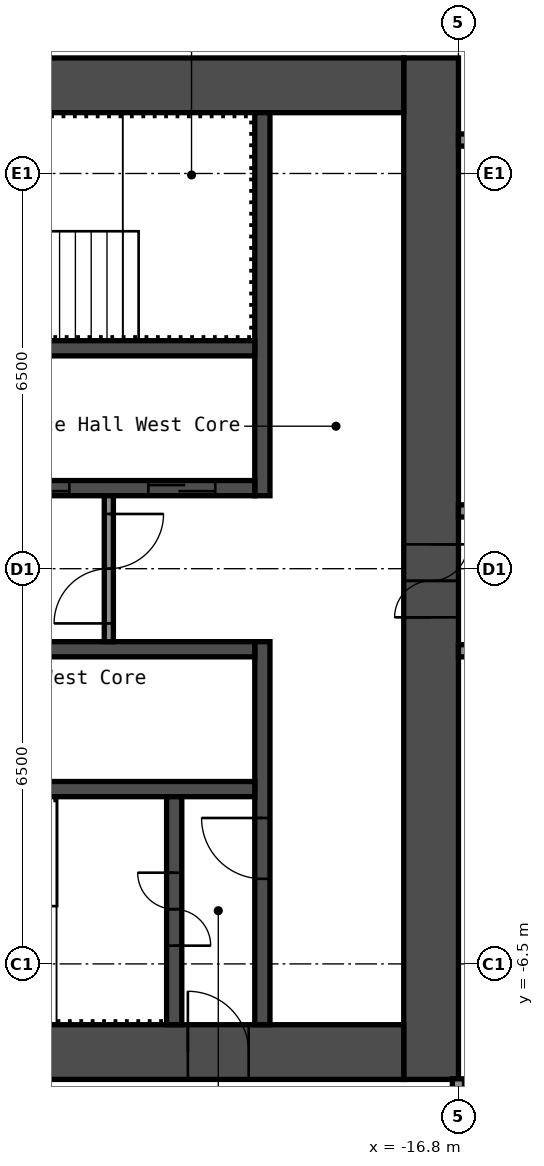
"""IFC4 building model, lengths in metres.
Left out: names, types, materials, properties, quantities, classifications, styles, units other than length and angle.
Written with IfcOpenShell. Run it as: python <this file> out.ifc"""

import sys

from ifc_helpers import new_model, si_unit, direction, frame, frame_2d, origin, place, context, subcontext, project, spatial, rectangle, extrude, element, fill, save


model = new_model("IFC4")
c1 = context("Model", 3, precision=1e-05, world=origin(), true_north=direction((0.0, 1.0)))
c2 = subcontext(c1, "Body", "Model", "MODEL_VIEW")
j1 = project(units=[si_unit("LENGTHUNIT", "METRE"), si_unit("PLANEANGLEUNIT", "RADIAN")], contexts=[c1])
p1 = place(None, origin())
s1 = spatial("IfcSite", under=j1, at=p1, CompositionType="ELEMENT")
p2 = place(p1, origin())
s2 = spatial("IfcBuilding", under=s1, at=p2, CompositionType="ELEMENT")
p3 = place(p2, frame((0.0, 0.0, 75.4)))
s3 = spatial("IfcBuildingStorey", under=s2, at=p3, CompositionType="ELEMENT", Elevation=75.4)
p4 = place(p3, frame((-17.25, -8.4, 0.0), z_axis=(0.0, 0.0, 1.0), x_axis=(0.0, 1.0, 0.0)))
e1 = element("IfcWall", 1, at=p4, inside=s3, PredefinedType="SHEAR", context=c2, shape_type="SweptSolid", body=[
    extrude(rectangle(XDim=16.8, YDim=0.9, at=frame_2d((8.4, 0.0))), origin(), (0.0, 0.0, 1.0), 2.8),
])
p5 = place(p4, frame((7.6, 0.0, 0.0)))
e2 = element("IfcOpeningElement", 2, at=p5, cuts=e1, PredefinedType="OPENING", context=c2, shape_type="SweptSolid", body=[
    extrude(rectangle(XDim=1.2, YDim=2.1, at=frame_2d((0.6, 1.05))), frame((0.0, 0.46, 0.0), z_axis=(0.0, -1.0, 0.0), x_axis=(1.0, 0.0, 0.0)), (0.0, 0.0, 1.0), 0.92),
])
p6 = place(p3, frame((-32.7, 7.95, 0.0), z_axis=(0.0, 0.0, 1.0), x_axis=(1.0, 0.0, 0.0)))
e3 = element("IfcWall", 3, at=p6, inside=s3, PredefinedType="SHEAR", context=c2, shape_type="SweptSolid", body=[
    extrude(rectangle(XDim=15.0, YDim=0.9, at=frame_2d((7.5, 0.0))), origin(), (0.0, 0.0, 1.0), 2.8),
])
p7 = place(p6, frame((3.4, 0.0, 0.0)))
e4 = element("IfcOpeningElement", 4, at=p7, cuts=e3, PredefinedType="OPENING", context=c2, shape_type="SweptSolid", body=[
    extrude(rectangle(XDim=1.2, YDim=2.1, at=frame_2d((0.6, 1.05))), frame((0.0, 0.46, 0.0), z_axis=(0.0, -1.0, 0.0), x_axis=(1.0, 0.0, 0.0)), (0.0, 0.0, 1.0), 0.92),
])
p8 = place(p6, frame((0.75, 0.0, 0.0)))
e5 = element("IfcOpeningElement", 5, at=p8, cuts=e3, PredefinedType="OPENING", context=c2, shape_type="SweptSolid", body=[
    extrude(rectangle(XDim=0.9, YDim=2.1, at=frame_2d((0.45, 1.05))), frame((0.0, 0.46, 0.0), z_axis=(0.0, -1.0, 0.0), x_axis=(1.0, 0.0, 0.0)), (0.0, 0.0, 1.0), 0.92),
])
p9 = place(p3, frame((-32.7, -7.95, 0.0), z_axis=(0.0, 0.0, 1.0), x_axis=(1.0, 0.0, 0.0)))
e6 = element("IfcWall", 6, at=p9, inside=s3, PredefinedType="SHEAR", context=c2, shape_type="SweptSolid", body=[
    extrude(rectangle(XDim=15.0, YDim=0.9, at=frame_2d((7.5, 0.0))), origin(), (0.0, 0.0, 1.0), 2.8),
])
p10 = place(p9, frame((11.45, 0.0, 0.0)))
e7 = element("IfcOpeningElement", 7, at=p10, cuts=e6, PredefinedType="OPENING", context=c2, shape_type="SweptSolid", body=[
    extrude(rectangle(XDim=1.0, YDim=2.1, at=frame_2d((0.5, 1.05))), frame((0.0, 0.46, 0.0), z_axis=(0.0, -1.0, 0.0), x_axis=(1.0, 0.0, 0.0)), (0.0, 0.0, 1.0), 0.92),
])
p11 = place(p3, frame((-20.025, 1.2, 0.0), z_axis=(0.0, 0.0, 1.0), x_axis=(0.0, 1.0, 0.0)))
e8 = element("IfcWall", 8, at=p11, inside=s3, PredefinedType="SHEAR", context=c2, shape_type="SweptSolid", body=[
    extrude(rectangle(XDim=6.3, YDim=0.25, at=frame_2d((3.15, 0.0))), origin(), (0.0, 0.0, 1.0), 2.8),
])
p12 = place(p3, frame((-20.025, -7.5, 0.0), z_axis=(0.0, 0.0, 1.0), x_axis=(0.0, 1.0, 0.0)))
e9 = element("IfcWall", 9, at=p12, inside=s3, PredefinedType="SHEAR", context=c2, shape_type="SweptSolid", body=[
    extrude(rectangle(XDim=6.3, YDim=0.25, at=frame_2d((3.15, 0.0))), origin(), (0.0, 0.0, 1.0), 2.8),
])
p13 = place(p12, frame((2.4, 0.0, 0.0)))
e10 = element("IfcOpeningElement", 10, at=p13, cuts=e9, PredefinedType="OPENING", context=c2, shape_type="SweptSolid", body=[
    extrude(rectangle(XDim=1.0, YDim=2.1, at=frame_2d((0.5, 1.05))), frame((0.0, 0.135, 0.0), z_axis=(0.0, -1.0, 0.0), x_axis=(1.0, 0.0, 0.0)), (0.0, 0.0, 1.0), 0.27),
])
p14 = place(p3, frame((-27.65, 1.325, 0.0), z_axis=(0.0, 0.0, 1.0), x_axis=(1.0, 0.0, 0.0)))
e11 = element("IfcWall", 11, at=p14, inside=s3, PredefinedType="SHEAR", context=c2, shape_type="SweptSolid", body=[
    extrude(rectangle(XDim=7.5, YDim=0.25, at=frame_2d((3.75, 0.0))), origin(), (0.0, 0.0, 1.0), 2.8),
])
p15 = place(p14, frame((5.75, 0.0, 0.0)))
e12 = element("IfcOpeningElement", 12, at=p15, cuts=e11, PredefinedType="OPENING", context=c2, shape_type="SweptSolid", body=[
    extrude(rectangle(XDim=1.1, YDim=2.1, at=frame_2d((0.55, 1.05))), frame((0.0, 0.135, 0.0), z_axis=(0.0, -1.0, 0.0), x_axis=(1.0, 0.0, 0.0)), (0.0, 0.0, 1.0), 0.27),
])
p16 = place(p14, frame((3.35, 0.0, 0.0)))
e13 = element("IfcOpeningElement", 13, at=p16, cuts=e11, PredefinedType="OPENING", context=c2, shape_type="SweptSolid", body=[
    extrude(rectangle(XDim=1.1, YDim=2.1, at=frame_2d((0.55, 1.05))), frame((0.0, 0.135, 0.0), z_axis=(0.0, -1.0, 0.0), x_axis=(1.0, 0.0, 0.0)), (0.0, 0.0, 1.0), 0.27),
])
p17 = place(p14, frame((0.95, 0.0, 0.0)))
e14 = element("IfcOpeningElement", 14, at=p17, cuts=e11, PredefinedType="OPENING", context=c2, shape_type="SweptSolid", body=[
    extrude(rectangle(XDim=1.1, YDim=2.1, at=frame_2d((0.55, 1.05))), frame((0.0, 0.135, 0.0), z_axis=(0.0, -1.0, 0.0), x_axis=(1.0, 0.0, 0.0)), (0.0, 0.0, 1.0), 0.27),
])
for number, where, z_axis, x_axis in (
    (15, (-27.65, 3.625, 0.0), (0.0, 0.0, 1.0), (1.0, 0.0, 0.0)),
    (16, (-27.65, -1.325, 0.0), (0.0, 0.0, 1.0), (1.0, 0.0, 0.0)),
    (17, (-27.65, -3.625, 0.0), (0.0, 0.0, 1.0), (1.0, 0.0, 0.0)),
):
    element("IfcWall", number, at=place(p3, frame(where, z_axis=z_axis, x_axis=x_axis)), inside=s3, PredefinedType="SHEAR", context=c2, shape_type="SweptSolid", body=[
        extrude(rectangle(XDim=7.5, YDim=0.25, at=frame_2d((3.75, 0.0))), origin(), (0.0, 0.0, 1.0), 2.8),
    ])
p18 = place(p3, frame((-21.475, -7.5, 0.0), z_axis=(0.0, 0.0, 1.0), x_axis=(0.0, 1.0, 0.0)))
e18 = element("IfcWall", 18, at=p18, inside=s3, PredefinedType="SHEAR", context=c2, shape_type="SweptSolid", body=[
    extrude(rectangle(XDim=3.75, YDim=0.25, at=frame_2d((1.875, 0.0))), origin(), (0.0, 0.0, 1.0), 2.8),
])
p19 = place(p18, frame((1.3, 0.0, 0.0)))
e19 = element("IfcOpeningElement", 19, at=p19, cuts=e18, PredefinedType="OPENING", context=c2, shape_type="SweptSolid", body=[
    extrude(rectangle(XDim=1.2, YDim=2.1, at=frame_2d((0.6, 1.05))), frame((0.0, 0.135, 0.0), z_axis=(0.0, -1.0, 0.0), x_axis=(1.0, 0.0, 0.0)), (0.0, 0.0, 1.0), 0.27),
])
p20 = place(p3, frame((-22.55, -1.2, 0.0), z_axis=(0.0, 0.0, 1.0), x_axis=(0.0, 1.0, 0.0)))
e20 = element("IfcWall", 20, at=p20, inside=s3, PredefinedType="PARTITIONING", context=c2, shape_type="SweptSolid", body=[
    extrude(rectangle(XDim=2.4, YDim=0.15, at=frame_2d((1.2, 0.0))), origin(), (0.0, 0.0, 1.0), 2.8),
])
p21 = place(p20, frame((0.3, 0.0, 0.0)))
e21 = element("IfcOpeningElement", 21, at=p21, cuts=e20, PredefinedType="OPENING", context=c2, shape_type="SweptSolid", body=[
    extrude(rectangle(XDim=1.8, YDim=2.1, at=frame_2d((0.9, 1.05))), frame((0.0, 0.085, 0.0), z_axis=(0.0, -1.0, 0.0), x_axis=(1.0, 0.0, 0.0)), (0.0, 0.0, 1.0), 0.17),
])
p22 = place(p3, frame((-16.8, -1.35, 0.0), z_axis=(0.0, 0.0, 1.0), x_axis=(1.0, 0.0, 0.0)))
e22 = element("IfcWall", 22, at=p22, inside=s3, PredefinedType="PARTITIONING", context=c2, shape_type="SweptSolid", body=[
    extrude(rectangle(XDim=33.6, YDim=0.2, at=frame_2d((16.8, 0.0))), origin(), (0.0, 0.0, 1.0), 2.8),
])
p23 = place(p22, frame((1.9, 0.0, 0.0)))
e23 = element("IfcOpeningElement", 23, at=p23, cuts=e22, PredefinedType="OPENING", context=c2, shape_type="SweptSolid", body=[
    extrude(rectangle(XDim=1.0, YDim=2.1, at=frame_2d((0.5, 1.05))), frame((0.0, 0.11, 0.0), z_axis=(0.0, -1.0, 0.0), x_axis=(1.0, 0.0, 0.0)), (0.0, 0.0, 1.0), 0.22),
])
p24 = place(p22, frame((9.63, 0.0, 0.0)))
e24 = element("IfcOpeningElement", 24, at=p24, cuts=e22, PredefinedType="OPENING", context=c2, shape_type="SweptSolid", body=[
    extrude(rectangle(XDim=0.9, YDim=2.1, at=frame_2d((0.45, 1.05))), frame((0.0, 0.11, 0.0), z_axis=(0.0, -1.0, 0.0), x_axis=(1.0, 0.0, 0.0)), (0.0, 0.0, 1.0), 0.22),
])
p25 = place(p22, frame((13.83, 0.0, 0.0)))
e25 = element("IfcOpeningElement", 25, at=p25, cuts=e22, PredefinedType="OPENING", context=c2, shape_type="SweptSolid", body=[
    extrude(rectangle(XDim=0.9, YDim=2.1, at=frame_2d((0.45, 1.05))), frame((0.0, 0.11, 0.0), z_axis=(0.0, -1.0, 0.0), x_axis=(1.0, 0.0, 0.0)), (0.0, 0.0, 1.0), 0.22),
])
p26 = place(p22, frame((22.2, 0.0, 0.0)))
e26 = element("IfcOpeningElement", 26, at=p26, cuts=e22, PredefinedType="OPENING", context=c2, shape_type="SweptSolid", body=[
    extrude(rectangle(XDim=1.0, YDim=2.1, at=frame_2d((0.5, 1.05))), frame((0.0, 0.11, 0.0), z_axis=(0.0, -1.0, 0.0), x_axis=(1.0, 0.0, 0.0)), (0.0, 0.0, 1.0), 0.22),
])
p27 = place(p22, frame((30.6, 0.0, 0.0)))
e27 = element("IfcOpeningElement", 27, at=p27, cuts=e22, PredefinedType="OPENING", context=c2, shape_type="SweptSolid", body=[
    extrude(rectangle(XDim=1.0, YDim=2.1, at=frame_2d((0.5, 1.05))), frame((0.0, 0.11, 0.0), z_axis=(0.0, -1.0, 0.0), x_axis=(1.0, 0.0, 0.0)), (0.0, 0.0, 1.0), 0.22),
])
p28 = place(p3, frame((-16.8, 0.95, 0.0), z_axis=(0.0, 0.0, 1.0), x_axis=(1.0, 0.0, 0.0)))
e28 = element("IfcWall", 28, at=p28, inside=s3, PredefinedType="PARTITIONING", context=c2, shape_type="SweptSolid", body=[
    extrude(rectangle(XDim=33.6, YDim=0.2, at=frame_2d((16.8, 0.0))), origin(), (0.0, 0.0, 1.0), 2.8),
])
p29 = place(p28, frame((10.22, 0.0, 0.0)))
e29 = element("IfcOpeningElement", 29, at=p29, cuts=e28, PredefinedType="OPENING", context=c2, shape_type="SweptSolid", body=[
    extrude(rectangle(XDim=0.9, YDim=2.1, at=frame_2d((0.45, 1.05))), frame((0.0, 0.11, 0.0), z_axis=(0.0, -1.0, 0.0), x_axis=(1.0, 0.0, 0.0)), (0.0, 0.0, 1.0), 0.22),
])
p30 = place(p28, frame((14.42, 0.0, 0.0)))
e30 = element("IfcOpeningElement", 30, at=p30, cuts=e28, PredefinedType="OPENING", context=c2, shape_type="SweptSolid", body=[
    extrude(rectangle(XDim=0.9, YDim=2.1, at=frame_2d((0.45, 1.05))), frame((0.0, 0.11, 0.0), z_axis=(0.0, -1.0, 0.0), x_axis=(1.0, 0.0, 0.0)), (0.0, 0.0, 1.0), 0.22),
])
p31 = place(p28, frame((27.27, 0.0, 0.0)))
e31 = element("IfcOpeningElement", 31, at=p31, cuts=e28, PredefinedType="OPENING", context=c2, shape_type="SweptSolid", body=[
    extrude(rectangle(XDim=0.9, YDim=2.1, at=frame_2d((0.45, 1.05))), frame((0.0, 0.11, 0.0), z_axis=(0.0, -1.0, 0.0), x_axis=(1.0, 0.0, 0.0)), (0.0, 0.0, 1.0), 0.22),
])
p32 = place(p28, frame((31.47, 0.0, 0.0)))
e32 = element("IfcOpeningElement", 32, at=p32, cuts=e28, PredefinedType="OPENING", context=c2, shape_type="SweptSolid", body=[
    extrude(rectangle(XDim=0.9, YDim=2.1, at=frame_2d((0.45, 1.05))), frame((0.0, 0.11, 0.0), z_axis=(0.0, -1.0, 0.0), x_axis=(1.0, 0.0, 0.0)), (0.0, 0.0, 1.0), 0.22),
])
p33 = place(p3, frame((-16.8, 7.05, 0.0), z_axis=(0.0, 0.0, 1.0), x_axis=(1.0, 0.0, 0.0)))
e33 = element("IfcWall", 33, at=p33, inside=s3, PredefinedType="PARTITIONING", context=c2, shape_type="SweptSolid", body=[
    extrude(rectangle(XDim=33.6, YDim=0.2, at=frame_2d((16.8, 0.0))), origin(), (0.0, 0.0, 1.0), 2.8),
])
p34 = place(p33, frame((2.155, 0.0, 0.0)))
e34 = element("IfcOpeningElement", 34, at=p34, cuts=e33, PredefinedType="OPENING", context=c2, shape_type="SweptSolid", body=[
    extrude(rectangle(XDim=0.9, YDim=2.1, at=frame_2d((0.45, 1.05))), frame((0.0, 0.11, 0.0), z_axis=(0.0, -1.0, 0.0), x_axis=(1.0, 0.0, 0.0)), (0.0, 0.0, 1.0), 0.22),
])
p35 = place(p33, frame((6.355, 0.0, 0.0)))
e35 = element("IfcOpeningElement", 35, at=p35, cuts=e33, PredefinedType="OPENING", context=c2, shape_type="SweptSolid", body=[
    extrude(rectangle(XDim=0.9, YDim=2.1, at=frame_2d((0.45, 1.05))), frame((0.0, 0.11, 0.0), z_axis=(0.0, -1.0, 0.0), x_axis=(1.0, 0.0, 0.0)), (0.0, 0.0, 1.0), 0.22),
])
p36 = place(p33, frame((18.28, 0.0, 0.0)))
e36 = element("IfcOpeningElement", 36, at=p36, cuts=e33, PredefinedType="OPENING", context=c2, shape_type="SweptSolid", body=[
    extrude(rectangle(XDim=0.9, YDim=2.1, at=frame_2d((0.45, 1.05))), frame((0.0, 0.11, 0.0), z_axis=(0.0, -1.0, 0.0), x_axis=(1.0, 0.0, 0.0)), (0.0, 0.0, 1.0), 0.22),
])
p37 = place(p33, frame((22.48, 0.0, 0.0)))
e37 = element("IfcOpeningElement", 37, at=p37, cuts=e33, PredefinedType="OPENING", context=c2, shape_type="SweptSolid", body=[
    extrude(rectangle(XDim=0.9, YDim=2.1, at=frame_2d((0.45, 1.05))), frame((0.0, 0.11, 0.0), z_axis=(0.0, -1.0, 0.0), x_axis=(1.0, 0.0, 0.0)), (0.0, 0.0, 1.0), 0.22),
])
p38 = place(p3, frame((-16.8, -15.55, 0.0), z_axis=(0.0, 0.0, 1.0), x_axis=(0.0, 1.0, 0.0)))
e38 = element("IfcWall", 38, at=p38, inside=s3, PredefinedType="PARTITIONING", context=c2, shape_type="SweptSolid", body=[
    extrude(rectangle(XDim=7.16, YDim=0.2, at=frame_2d((3.58, 0.0))), origin(), (0.0, 0.0, 1.0), 2.8),
])
p39 = place(p5, origin())
e39 = element("IfcDoor", 39, at=p39, inside=s3, OperationType="DOUBLE_DOOR_SINGLE_SWING", PredefinedType="DOOR", context=c2, shape_type="SweptSolid", body=[
    extrude(rectangle(XDim=1.2, YDim=2.1, at=frame_2d((0.6, 1.05))), frame((0.0, 0.025, 0.0), z_axis=(0.0, -1.0, 0.0), x_axis=(1.0, 0.0, 0.0)), (0.0, 0.0, 1.0), 0.05),
])
fill(e2, e39)
p40 = place(p10, origin())
e40 = element("IfcDoor", 40, at=p40, inside=s3, OperationType="SINGLE_SWING_RIGHT", PredefinedType="DOOR", context=c2, shape_type="SweptSolid", body=[
    extrude(rectangle(XDim=1.0, YDim=2.1, at=frame_2d((0.5, 1.05))), frame((0.0, 0.025, 0.0), z_axis=(0.0, -1.0, 0.0), x_axis=(1.0, 0.0, 0.0)), (0.0, 0.0, 1.0), 0.05),
])
fill(e7, e40)
p41 = place(p19, origin())
e41 = element("IfcDoor", 41, at=p41, inside=s3, OperationType="DOUBLE_DOOR_SINGLE_SWING", PredefinedType="DOOR", context=c2, shape_type="SweptSolid", body=[
    extrude(rectangle(XDim=1.2, YDim=2.1, at=frame_2d((0.6, 1.05))), frame((0.0, 0.025, 0.0), z_axis=(0.0, -1.0, 0.0), x_axis=(1.0, 0.0, 0.0)), (0.0, 0.0, 1.0), 0.05),
])
fill(e19, e41)
p42 = place(p13, origin())
e42 = element("IfcDoor", 42, at=p42, inside=s3, OperationType="SINGLE_SWING_LEFT", PredefinedType="DOOR", context=c2, shape_type="SweptSolid", body=[
    extrude(rectangle(XDim=1.0, YDim=2.1, at=frame_2d((0.5, 1.05))), frame((0.0, 0.025, 0.0), z_axis=(0.0, -1.0, 0.0), x_axis=(1.0, 0.0, 0.0)), (0.0, 0.0, 1.0), 0.05),
])
fill(e10, e42)
p43 = place(p21, origin())
e43 = element("IfcDoor", 43, at=p43, inside=s3, OperationType="DOUBLE_DOOR_SINGLE_SWING", PredefinedType="DOOR", context=c2, shape_type="SweptSolid", body=[
    extrude(rectangle(XDim=1.8, YDim=2.1, at=frame_2d((0.9, 1.05))), frame((0.0, 0.025, 0.0), z_axis=(0.0, -1.0, 0.0), x_axis=(1.0, 0.0, 0.0)), (0.0, 0.0, 1.0), 0.05),
])
fill(e21, e43)
p44 = place(p15, origin())
e44 = element("IfcDoor", 44, at=p44, inside=s3, OperationType="DOUBLE_DOOR_SLIDING", PredefinedType="DOOR", context=c2, shape_type="SweptSolid", body=[
    extrude(rectangle(XDim=1.1, YDim=2.1, at=frame_2d((0.55, 1.05))), frame((0.0, 0.025, 0.0), z_axis=(0.0, -1.0, 0.0), x_axis=(1.0, 0.0, 0.0)), (0.0, 0.0, 1.0), 0.05),
])
fill(e12, e44)
p45 = place(p16, origin())
e45 = element("IfcDoor", 45, at=p45, inside=s3, OperationType="DOUBLE_DOOR_SLIDING", PredefinedType="DOOR", context=c2, shape_type="SweptSolid", body=[
    extrude(rectangle(XDim=1.1, YDim=2.1, at=frame_2d((0.55, 1.05))), frame((0.0, 0.025, 0.0), z_axis=(0.0, -1.0, 0.0), x_axis=(1.0, 0.0, 0.0)), (0.0, 0.0, 1.0), 0.05),
])
fill(e13, e45)
save(model, sys.argv[1])
